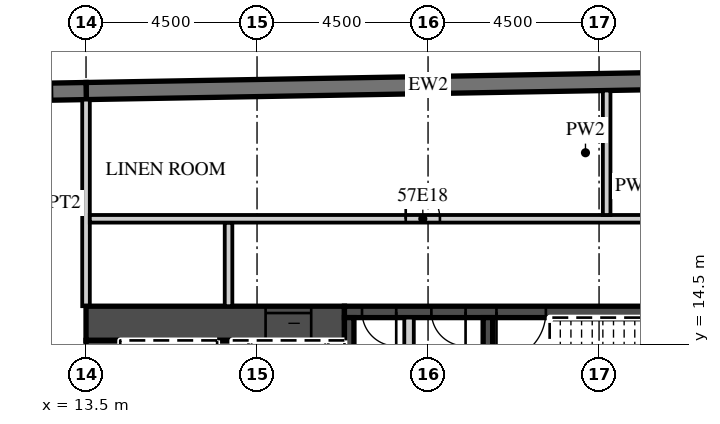
"""IFC4 building model, lengths in metres.
Left out: names, types, materials, properties, quantities, classifications, styles, units other than length and angle.
Written with IfcOpenShell. Run it as: python <this file> out.ifc"""

import sys

from ifc_helpers import new_model, si_unit, direction, frame, frame_2d, origin, place, context, subcontext, project, spatial, rectangle, extrude, element, fill, save


model = new_model("IFC4")
c1 = context("Model", 3, precision=1e-05, world=origin(), true_north=direction((0.0, 1.0)))
c2 = subcontext(c1, "Body", "Model", "MODEL_VIEW")
j1 = project(units=[si_unit("LENGTHUNIT", "METRE"), si_unit("PLANEANGLEUNIT", "RADIAN")], contexts=[c1])
p1 = place(None, origin())
s1 = spatial("IfcSite", under=j1, at=p1, CompositionType="ELEMENT")
p2 = place(p1, origin())
s2 = spatial("IfcBuilding", under=s1, at=p2, CompositionType="ELEMENT")
p3 = place(p2, frame((0.0, 0.0, 234.2)))
s3 = spatial("IfcBuildingStorey", under=s2, at=p3, CompositionType="ELEMENT", Elevation=234.2)
p4 = place(p3, frame((31.504, 21.476, 0.0), z_axis=(0.0, 0.0, 1.0), x_axis=(-0.999847677887, -0.017453395744, 0.0)))
e1 = element("IfcWall", 1, at=p4, inside=s3, PredefinedType="SOLIDWALL", context=c2, shape_type="SweptSolid", body=[
    extrude(rectangle(XDim=18.003, YDim=0.45, at=frame_2d((9.001, 0.0))), origin(), (0.0, 0.0, 1.0), 3.02),
])
p5 = place(p3, frame((13.504, 21.161, 0.0), z_axis=(0.0, 0.0, 1.0), x_axis=(-0.999847763257, -0.017448504532, 0.0)))
e2 = element("IfcWall", 2, at=p5, inside=s3, PredefinedType="SOLIDWALL", context=c2, shape_type="SweptSolid", body=[
    extrude(rectangle(XDim=46.859, YDim=0.45, at=frame_2d((23.43, 0.0))), origin(), (0.0, 0.0, 1.0), 3.02),
])
p6 = place(p5, frame((0.9, 0.0, 0.45)))
e3 = element("IfcOpeningElement", 3, at=p6, cuts=e2, PredefinedType="OPENING", context=c2, shape_type="SweptSolid", body=[
    extrude(rectangle(XDim=2.7, YDim=2.25, at=frame_2d((1.35, 1.125))), frame((0.0, 0.235, 0.0), z_axis=(0.0, -1.0, 0.0), x_axis=(1.0, 0.0, 0.0)), (0.0, 0.0, 1.0), 0.47),
])
p7 = place(p5, frame((5.401, 0.0, 0.45)))
e4 = element("IfcOpeningElement", 4, at=p7, cuts=e2, PredefinedType="OPENING", context=c2, shape_type="SweptSolid", body=[
    extrude(rectangle(XDim=2.7, YDim=2.25, at=frame_2d((1.35, 1.125))), frame((0.0, 0.235, 0.0), z_axis=(0.0, -1.0, 0.0), x_axis=(1.0, 0.0, 0.0)), (0.0, 0.0, 1.0), 0.47),
])
p8 = place(p5, frame((9.902, 0.0, 0.45)))
e5 = element("IfcOpeningElement", 5, at=p8, cuts=e2, PredefinedType="OPENING", context=c2, shape_type="SweptSolid", body=[
    extrude(rectangle(XDim=2.7, YDim=2.25, at=frame_2d((1.35, 1.125))), frame((0.0, 0.235, 0.0), z_axis=(0.0, -1.0, 0.0), x_axis=(1.0, 0.0, 0.0)), (0.0, 0.0, 1.0), 0.47),
])
p9 = place(p5, frame((14.402, 0.0, 0.45)))
e6 = element("IfcOpeningElement", 6, at=p9, cuts=e2, PredefinedType="OPENING", context=c2, shape_type="SweptSolid", body=[
    extrude(rectangle(XDim=2.7, YDim=2.25, at=frame_2d((1.35, 1.125))), frame((0.0, 0.235, 0.0), z_axis=(0.0, -1.0, 0.0), x_axis=(1.0, 0.0, 0.0)), (0.0, 0.0, 1.0), 0.47),
])
p10 = place(p5, frame((18.903, 0.0, 0.45)))
e7 = element("IfcOpeningElement", 7, at=p10, cuts=e2, PredefinedType="OPENING", context=c2, shape_type="SweptSolid", body=[
    extrude(rectangle(XDim=2.7, YDim=2.25, at=frame_2d((1.35, 1.125))), frame((0.0, 0.235, 0.0), z_axis=(0.0, -1.0, 0.0), x_axis=(1.0, 0.0, 0.0)), (0.0, 0.0, 1.0), 0.47),
])
p11 = place(p5, frame((23.404, 0.0, 0.45)))
e8 = element("IfcOpeningElement", 8, at=p11, cuts=e2, PredefinedType="OPENING", context=c2, shape_type="SweptSolid", body=[
    extrude(rectangle(XDim=2.7, YDim=2.25, at=frame_2d((1.35, 1.125))), frame((0.0, 0.235, 0.0), z_axis=(0.0, -1.0, 0.0), x_axis=(1.0, 0.0, 0.0)), (0.0, 0.0, 1.0), 0.47),
])
p12 = place(p5, frame((27.904, 0.0, 0.45)))
e9 = element("IfcOpeningElement", 9, at=p12, cuts=e2, PredefinedType="OPENING", context=c2, shape_type="SweptSolid", body=[
    extrude(rectangle(XDim=2.7, YDim=2.25, at=frame_2d((1.35, 1.125))), frame((0.0, 0.235, 0.0), z_axis=(0.0, -1.0, 0.0), x_axis=(1.0, 0.0, 0.0)), (0.0, 0.0, 1.0), 0.47),
])
p13 = place(p5, frame((32.405, 0.0, 0.45)))
e10 = element("IfcOpeningElement", 10, at=p13, cuts=e2, PredefinedType="OPENING", context=c2, shape_type="SweptSolid", body=[
    extrude(rectangle(XDim=2.7, YDim=2.25, at=frame_2d((1.35, 1.125))), frame((0.0, 0.235, 0.0), z_axis=(0.0, -1.0, 0.0), x_axis=(1.0, 0.0, 0.0)), (0.0, 0.0, 1.0), 0.47),
])
p14 = place(p5, frame((36.906, 0.0, 0.45)))
e11 = element("IfcOpeningElement", 11, at=p14, cuts=e2, PredefinedType="OPENING", context=c2, shape_type="SweptSolid", body=[
    extrude(rectangle(XDim=2.7, YDim=2.25, at=frame_2d((1.35, 1.125))), frame((0.0, 0.235, 0.0), z_axis=(0.0, -1.0, 0.0), x_axis=(1.0, 0.0, 0.0)), (0.0, 0.0, 1.0), 0.47),
])
p15 = place(p5, frame((41.406, 0.0, 0.45)))
e12 = element("IfcOpeningElement", 12, at=p15, cuts=e2, PredefinedType="OPENING", context=c2, shape_type="SweptSolid", body=[
    extrude(rectangle(XDim=2.7, YDim=2.25, at=frame_2d((1.35, 1.125))), frame((0.0, 0.235, 0.0), z_axis=(0.0, -1.0, 0.0), x_axis=(1.0, 0.0, 0.0)), (0.0, 0.0, 1.0), 0.47),
])
p16 = place(p3, frame((13.5, 15.5, 0.0), z_axis=(0.0, 0.0, 1.0), x_axis=(0.0, 1.0, 0.0)))
e13 = element("IfcWall", 13, at=p16, inside=s3, PredefinedType="PARTITIONING", context=c2, shape_type="SweptSolid", body=[
    extrude(rectangle(XDim=5.436, YDim=0.2, at=frame_2d((2.718, 0.0))), origin(), (0.0, 0.0, 1.0), 3.02),
])
p17 = place(p3, frame((13.5, 15.05, 0.0), z_axis=(0.0, 0.0, 1.0), x_axis=(1.0, 0.0, 0.0)))
e14 = element("IfcWall", 14, at=p17, inside=s3, PredefinedType="SHEAR", context=c2, shape_type="SweptSolid", body=[
    extrude(rectangle(XDim=6.8, YDim=0.9, at=frame_2d((3.4, 0.0))), origin(), (0.0, 0.0, 1.0), 3.02),
])
p18 = place(p17, frame((4.725, 0.0, 0.0)))
e15 = element("IfcOpeningElement", 15, at=p18, cuts=e14, PredefinedType="OPENING", context=c2, shape_type="SweptSolid", body=[
    extrude(rectangle(XDim=1.2, YDim=2.1, at=frame_2d((0.6, 1.05))), frame((0.0, 0.46, 0.0), z_axis=(0.0, -1.0, 0.0), x_axis=(1.0, 0.0, 0.0)), (0.0, 0.0, 1.0), 0.92),
])
p19 = place(p3, frame((20.3, 15.35, 0.0), z_axis=(0.0, 0.0, 1.0), x_axis=(1.0, 0.0, 0.0)))
e16 = element("IfcWall", 16, at=p19, inside=s3, PredefinedType="SHEAR", context=c2, shape_type="SweptSolid", body=[
    extrude(rectangle(XDim=10.3, YDim=0.3, at=frame_2d((5.15, 0.0))), origin(), (0.0, 0.0, 1.0), 3.02),
])
p20 = place(p19, frame((4.0, 0.0, 0.0)))
e17 = element("IfcOpeningElement", 17, at=p20, cuts=e16, PredefinedType="OPENING", context=c2, shape_type="SweptSolid", body=[
    extrude(rectangle(XDim=1.3, YDim=2.1, at=frame_2d((0.65, 1.05))), frame((0.0, 0.16, 0.0), z_axis=(0.0, -1.0, 0.0), x_axis=(1.0, 0.0, 0.0)), (0.0, 0.0, 1.0), 0.32),
])
p21 = place(p19, frame((2.288, 0.0, 0.0)))
e18 = element("IfcOpeningElement", 18, at=p21, cuts=e16, PredefinedType="OPENING", context=c2, shape_type="SweptSolid", body=[
    extrude(rectangle(XDim=0.9, YDim=2.1, at=frame_2d((0.45, 1.05))), frame((0.0, 0.16, 0.0), z_axis=(0.0, -1.0, 0.0), x_axis=(1.0, 0.0, 0.0)), (0.0, 0.0, 1.0), 0.32),
])
p22 = place(p19, frame((0.462, 0.0, 0.0)))
e19 = element("IfcOpeningElement", 19, at=p22, cuts=e16, PredefinedType="OPENING", context=c2, shape_type="SweptSolid", body=[
    extrude(rectangle(XDim=0.9, YDim=2.1, at=frame_2d((0.45, 1.05))), frame((0.0, 0.16, 0.0), z_axis=(0.0, -1.0, 0.0), x_axis=(1.0, 0.0, 0.0)), (0.0, 0.0, 1.0), 0.32),
])
p23 = place(p3, frame((13.95, 2.4, 0.0), z_axis=(0.0, 0.0, 1.0), x_axis=(0.0, 1.0, 0.0)))
e20 = element("IfcWall", 20, at=p23, inside=s3, PredefinedType="SHEAR", context=c2, shape_type="SweptSolid", body=[
    extrude(rectangle(XDim=12.2, YDim=0.9, at=frame_2d((6.1, 0.0))), origin(), (0.0, 0.0, 1.0), 3.02),
])
p24 = place(p3, frame((17.15, 8.8, 0.0), z_axis=(0.0, 0.0, 1.0), x_axis=(0.0, 1.0, 0.0)))
e21 = element("IfcWall", 21, at=p24, inside=s3, PredefinedType="SHEAR", context=c2, shape_type="SweptSolid", body=[
    extrude(rectangle(XDim=5.8, YDim=0.4, at=frame_2d((2.9, 0.0))), origin(), (0.0, 0.0, 1.0), 3.02),
])
for number, where, z_axis, x_axis in (
    (22, (20.425, 11.95, 0.0), (0.0, 0.0, 1.0), (0.0, 1.0, 0.0)),
    (23, (24.075, 11.95, 0.0), (0.0, 0.0, 1.0), (0.0, 1.0, 0.0)),
):
    element("IfcWall", number, at=place(p3, frame(where, z_axis=z_axis, x_axis=x_axis)), inside=s3, PredefinedType="SHEAR", context=c2, shape_type="SweptSolid", body=[
        extrude(rectangle(XDim=3.25, YDim=0.25, at=frame_2d((1.625, 0.0))), origin(), (0.0, 0.0, 1.0), 3.02),
    ])
p25 = place(p3, frame((22.0, 11.95, 0.0), z_axis=(0.0, 0.0, 1.0), x_axis=(0.0, 1.0, 0.0)))
e24 = element("IfcWall", 24, at=p25, inside=s3, PredefinedType="PARTITIONING", context=c2, shape_type="SweptSolid", body=[
    extrude(rectangle(XDim=3.25, YDim=0.25, at=frame_2d((1.625, 0.0))), origin(), (0.0, 0.0, 1.0), 3.02),
])
p26 = place(p3, frame((17.25, 15.5, 0.0), z_axis=(0.0, 0.0, 1.0), x_axis=(0.0, 1.0, 0.0)))
e25 = element("IfcWall", 25, at=p26, inside=s3, PredefinedType="PARTITIONING", context=c2, shape_type="SweptSolid", body=[
    extrude(rectangle(XDim=2.2, YDim=0.2, at=frame_2d((1.1, 0.0))), origin(), (0.0, 0.0, 1.0), 3.02),
])
p27 = place(p3, frame((13.6, 17.8, 0.0), z_axis=(0.0, 0.0, 1.0), x_axis=(1.0, 0.0, 0.0)))
e26 = element("IfcWall", 26, at=p27, inside=s3, PredefinedType="PARTITIONING", context=c2, shape_type="SweptSolid", body=[
    extrude(rectangle(XDim=28.657, YDim=0.2, at=frame_2d((14.329, 0.0))), origin(), (0.0, 0.0, 1.0), 3.02),
])
p28 = place(p27, frame((16.613, 0.0, 0.0)))
e27 = element("IfcOpeningElement", 27, at=p28, cuts=e26, PredefinedType="OPENING", context=c2, shape_type="SweptSolid", body=[
    extrude(rectangle(XDim=0.9, YDim=2.1, at=frame_2d((0.45, 1.05))), frame((0.0, 0.11, 0.0), z_axis=(0.0, -1.0, 0.0), x_axis=(1.0, 0.0, 0.0)), (0.0, 0.0, 1.0), 0.22),
])
p29 = place(p27, frame((8.312, 0.0, 0.0)))
e28 = element("IfcOpeningElement", 28, at=p29, cuts=e26, PredefinedType="OPENING", context=c2, shape_type="SweptSolid", body=[
    extrude(rectangle(XDim=0.9, YDim=2.1, at=frame_2d((0.45, 1.05))), frame((0.0, 0.11, 0.0), z_axis=(0.0, -1.0, 0.0), x_axis=(1.0, 0.0, 0.0)), (0.0, 0.0, 1.0), 0.22),
])
p30 = place(p3, frame((27.2, 17.9, 0.0), z_axis=(0.0, 0.0, 1.0), x_axis=(0.0, 1.0, 0.0)))
e29 = element("IfcWall", 29, at=p30, inside=s3, PredefinedType="PARTITIONING", context=c2, shape_type="SweptSolid", body=[
    extrude(rectangle(XDim=3.276, YDim=0.2, at=frame_2d((1.638, 0.0))), origin(), (0.0, 0.0, 1.0), 3.02),
])
p31 = place(p6, origin())
e30 = element("IfcWindow", 30, at=p31, inside=s3, PartitioningType="SINGLE_PANEL", PredefinedType="WINDOW", context=c2, shape_type="SweptSolid", body=[
    extrude(rectangle(XDim=2.7, YDim=2.25, at=frame_2d((1.35, 1.125))), frame((0.0, 0.09, 0.0), z_axis=(0.0, -1.0, 0.0), x_axis=(1.0, 0.0, 0.0)), (0.0, 0.0, 1.0), 0.06),
])
fill(e3, e30)
p32 = place(p18, origin())
e31 = element("IfcDoor", 31, at=p32, inside=s3, OperationType="SLIDING_TO_LEFT", PredefinedType="DOOR", context=c2, shape_type="SweptSolid", body=[
    extrude(rectangle(XDim=1.2, YDim=2.1, at=frame_2d((0.6, 1.05))), frame((0.0, 0.025, 0.0), z_axis=(0.0, -1.0, 0.0), x_axis=(1.0, 0.0, 0.0)), (0.0, 0.0, 1.0), 0.05),
])
fill(e15, e31)
p33 = place(p20, origin())
e32 = element("IfcDoor", 32, at=p33, inside=s3, OperationType="SINGLE_SWING_LEFT", PredefinedType="DOOR", context=c2, shape_type="SweptSolid", body=[
    extrude(rectangle(XDim=1.3, YDim=2.1, at=frame_2d((0.65, 1.05))), frame((0.0, 0.025, 0.0), z_axis=(0.0, -1.0, 0.0), x_axis=(1.0, 0.0, 0.0)), (0.0, 0.0, 1.0), 0.05),
])
fill(e17, e32)
p34 = place(p21, origin())
e33 = element("IfcDoor", 33, at=p34, inside=s3, OperationType="SINGLE_SWING_RIGHT", PredefinedType="DOOR", context=c2, shape_type="SweptSolid", body=[
    extrude(rectangle(XDim=0.9, YDim=2.1, at=frame_2d((0.45, 1.05))), frame((0.0, 0.025, 0.0), z_axis=(0.0, -1.0, 0.0), x_axis=(1.0, 0.0, 0.0)), (0.0, 0.0, 1.0), 0.05),
])
fill(e18, e33)
p35 = place(p22, origin())
e34 = element("IfcDoor", 34, at=p35, inside=s3, OperationType="SINGLE_SWING_RIGHT", PredefinedType="DOOR", context=c2, shape_type="SweptSolid", body=[
    extrude(rectangle(XDim=0.9, YDim=2.1, at=frame_2d((0.45, 1.05))), frame((0.0, 0.025, 0.0), z_axis=(0.0, -1.0, 0.0), x_axis=(1.0, 0.0, 0.0)), (0.0, 0.0, 1.0), 0.05),
])
fill(e19, e34)
p36 = place(p29, origin())
e35 = element("IfcDoor", 35, at=p36, inside=s3, OperationType="SINGLE_SWING_LEFT", PredefinedType="DOOR", context=c2, shape_type="SweptSolid", body=[
    extrude(rectangle(XDim=0.9, YDim=2.1, at=frame_2d((0.45, 1.05))), frame((0.0, 0.025, 0.0), z_axis=(0.0, -1.0, 0.0), x_axis=(1.0, 0.0, 0.0)), (0.0, 0.0, 1.0), 0.05),
])
fill(e28, e35)
save(model, sys.argv[1])
